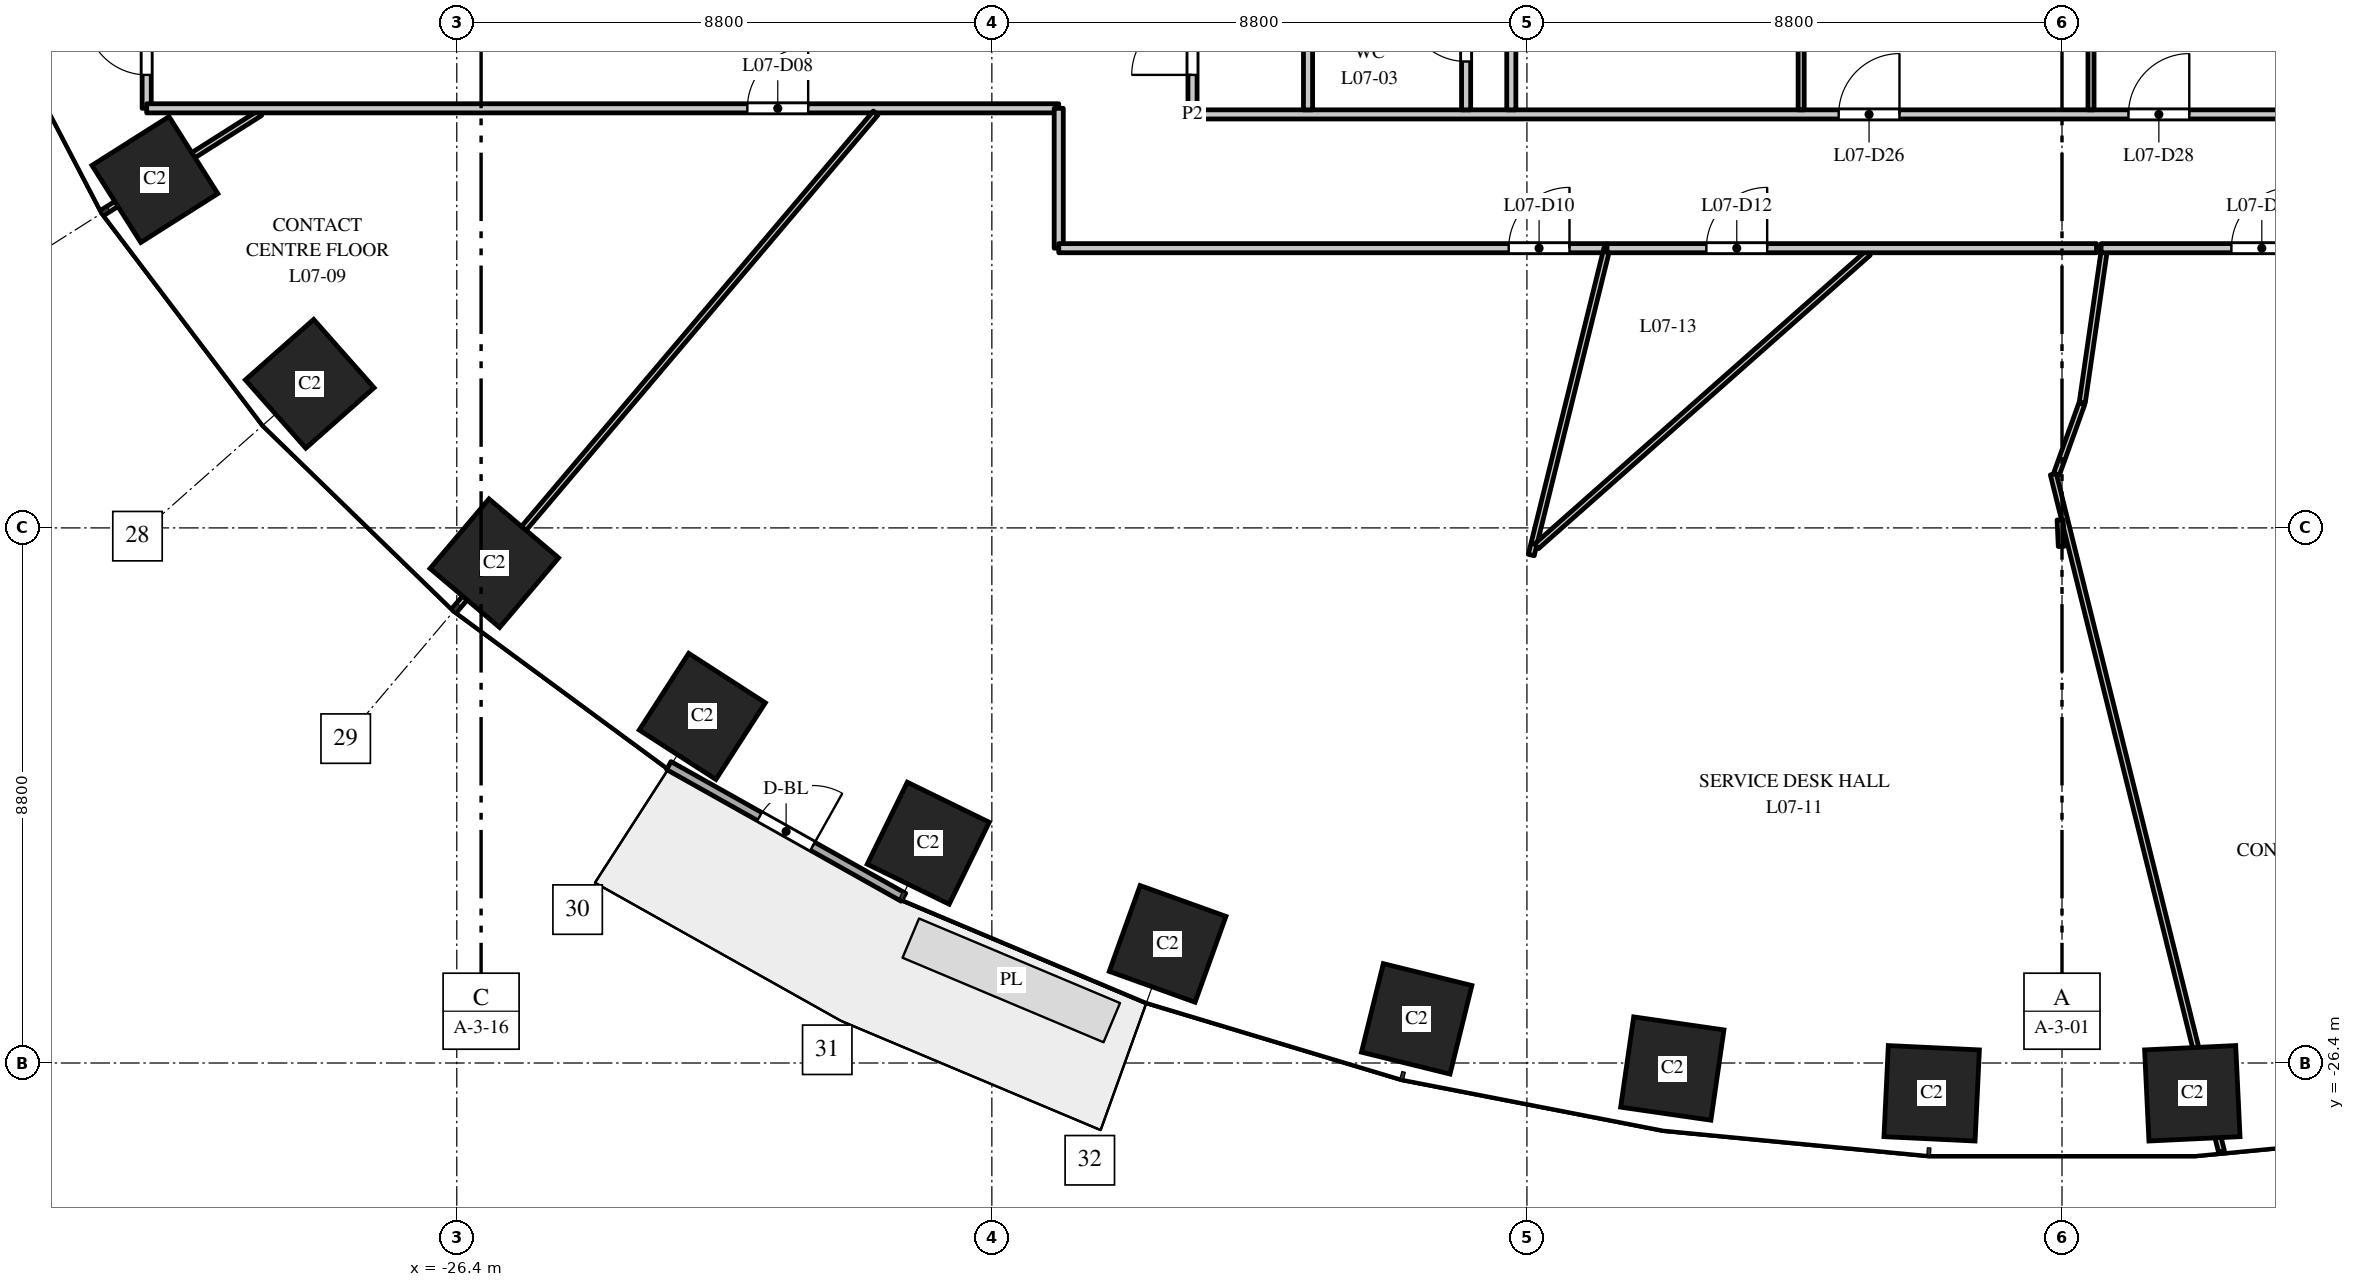
"""IFC4 building model, lengths in metres.
Left out: names, types, materials, properties, quantities, classifications, styles, units other than length and angle.
Written with IfcOpenShell. Run it as: python <this file> out.ifc"""

import sys

from ifc_helpers import new_model, si_unit, direction, frame, frame_2d, origin, origin_2d, place, context, subcontext, project, spatial, rectangle, extrude, element, fill, save


model = new_model("IFC4")
c1 = context("Model", 3, precision=1e-05, world=origin(), true_north=direction((0.0, 1.0)))
c2 = subcontext(c1, "Body", "Model", "MODEL_VIEW")
j1 = project(units=[si_unit("LENGTHUNIT", "METRE"), si_unit("PLANEANGLEUNIT", "RADIAN")], contexts=[c1])
p1 = place(None, origin())
s1 = spatial("IfcSite", under=j1, at=p1, CompositionType="ELEMENT")
p2 = place(p1, origin())
s2 = spatial("IfcBuilding", under=s1, at=p2, CompositionType="ELEMENT")
p3 = place(p2, frame((0.0, 0.0, 38.5)))
s3 = spatial("IfcBuildingStorey", under=s2, at=p3, CompositionType="ELEMENT", Elevation=38.5)
for number, where, z_axis, x_axis in (
    (1, (-31.365, -11.871, 0.0), (0.0, 0.0, 1.0), (0.535, -0.845, 0.0)),
    (2, (-28.819, -15.23, 0.0), (0.0, 0.0, 1.0), (0.663, -0.749, 0.0)),
    (3, (-25.783, -18.18, 0.0), (0.0, 0.0, 1.0), (0.763, -0.646, 0.0)),
    (4, (-22.362, -20.7, 0.0), (0.0, 0.0, 1.0), (0.84, -0.542, 0.0)),
    (5, (-18.646, -22.785, 0.0), (0.0, 0.0, 1.0), (0.898, -0.439, 0.0)),
    (6, (-14.709, -24.441, 0.0), (0.0, 0.0, 1.0), (0.941, -0.338, 0.0)),
    (7, (-10.613, -25.674, 0.0), (0.0, 0.0, 1.0), (0.971, -0.24, 0.0)),
    (8, (-6.409, -26.491, 0.0), (0.0, 0.0, 1.0), (0.99, -0.143, 0.0)),
    (9, (-2.143, -26.898, 0.0), (0.0, 0.0, 1.0), (0.999, -0.048, 0.0)),
    (10, (2.143, -26.898, 0.0), (0.0, 0.0, 1.0), (0.999, 0.048, 0.0)),
):
    element("IfcColumn", number, at=place(p3, frame(where, z_axis=z_axis, x_axis=x_axis)), inside=s3, PredefinedType="COLUMN", context=c2, shape_type="SweptSolid", body=[
        extrude(rectangle(XDim=1.5, YDim=1.5, at=origin_2d()), origin(), (0.0, 0.0, 1.0), 4.0),
    ])
p4 = place(p3, frame((-22.913, -21.509, 0.0), z_axis=(0.0, 0.0, 1.0), x_axis=(0.872046572975, -0.489422899509, 0.0)))
e11 = element("IfcWall", 11, at=p4, inside=s3, PredefinedType="STANDARD", context=c2, shape_type="SweptSolid", body=[
    extrude(rectangle(XDim=4.426, YDim=0.15, at=frame_2d((2.213, 0.0))), origin(), (0.0, 0.0, 1.0), 3.7),
])
p5 = place(p4, frame((1.713, 0.0, 0.0)))
e12 = element("IfcOpeningElement", 12, at=p5, cuts=e11, PredefinedType="OPENING", context=c2, shape_type="SweptSolid", body=[
    extrude(rectangle(XDim=1.0, YDim=2.4, at=frame_2d((0.5, 1.2))), frame((0.0, 0.085, 0.0), z_axis=(0.0, -1.0, 0.0), x_axis=(1.0, 0.0, 0.0)), (0.0, 0.0, 1.0), 0.17),
])
p6 = place(p3, frame((-32.212, -12.408, 0.0), z_axis=(0.0, 0.0, 1.0), x_axis=(0.844810627195, 0.535065420467, 0.0)))
e13 = element("IfcWall", 13, at=p6, inside=s3, PredefinedType="PARTITIONING", context=c2, shape_type="SweptSolid", body=[
    extrude(rectangle(XDim=3.048, YDim=0.1, at=frame_2d((1.524, 0.0))), origin(), (0.0, 0.0, 1.0), 3.7),
])
p7 = place(p3, frame((-31.5, -10.7, 0.0), z_axis=(0.0, 0.0, 1.0), x_axis=(0.0, 1.0, 0.0)))
e14 = element("IfcWall", 14, at=p7, inside=s3, PredefinedType="PARTITIONING", context=c2, shape_type="SweptSolid", body=[
    extrude(rectangle(XDim=2.2, YDim=0.15, at=frame_2d((1.1, 0.0))), origin(), (0.0, 0.0, 1.0), 3.7),
])
p8 = place(p7, frame((0.55, 0.0, 0.0)))
e15 = element("IfcOpeningElement", 15, at=p8, cuts=e14, PredefinedType="OPENING", context=c2, shape_type="SweptSolid", body=[
    extrude(rectangle(XDim=1.0, YDim=2.1, at=frame_2d((0.5, 1.05))), frame((0.0, 0.085, 0.0), z_axis=(0.0, -1.0, 0.0), x_axis=(1.0, 0.0, 0.0)), (0.0, 0.0, 1.0), 0.17),
])
p9 = place(p3, frame((-31.5, -10.7, 0.0), z_axis=(0.0, 0.0, 1.0), x_axis=(1.0, 0.0, 0.0)))
e16 = element("IfcWall", 16, at=p9, inside=s3, PredefinedType="PARTITIONING", context=c2, shape_type="SweptSolid", body=[
    extrude(rectangle(XDim=15.0, YDim=0.15, at=frame_2d((7.5, 0.0))), origin(), (0.0, 0.0, 1.0), 3.1),
])
p10 = place(p9, frame((9.879, 0.0, 0.0)))
e17 = element("IfcOpeningElement", 17, at=p10, cuts=e16, PredefinedType="OPENING", context=c2, shape_type="SweptSolid", body=[
    extrude(rectangle(XDim=1.0, YDim=2.1, at=frame_2d((0.5, 1.05))), frame((0.0, 0.085, 0.0), z_axis=(0.0, -1.0, 0.0), x_axis=(1.0, 0.0, 0.0)), (0.0, 0.0, 1.0), 0.17),
])
p11 = place(p3, frame((-26.43, -18.945, 0.0), z_axis=(0.0, 0.0, 1.0), x_axis=(0.646400187952, 0.762998556365, 0.0)))
e18 = element("IfcWall", 18, at=p11, inside=s3, PredefinedType="PARTITIONING", context=c2, shape_type="SweptSolid", body=[
    extrude(rectangle(XDim=10.704, YDim=0.1, at=frame_2d((5.352, 0.0))), origin(), (0.0, 0.0, 1.0), 3.7),
])
p12 = place(p3, frame((-16.5, -13.0, 0.0), z_axis=(0.0, 0.0, 1.0), x_axis=(0.0, 1.0, 0.0)))
e19 = element("IfcWall", 19, at=p12, inside=s3, PredefinedType="PARTITIONING", context=c2, shape_type="SweptSolid", body=[
    extrude(rectangle(XDim=2.3, YDim=0.15, at=frame_2d((1.15, 0.0))), origin(), (0.0, 0.0, 1.0), 2.75),
])
p13 = place(p3, frame((-16.5, -13.0, 0.0), z_axis=(0.0, 0.0, 1.0), x_axis=(1.0, 0.0, 0.0)))
e20 = element("IfcWall", 20, at=p13, inside=s3, PredefinedType="PARTITIONING", context=c2, shape_type="SweptSolid", body=[
    extrude(rectangle(XDim=9.001, YDim=0.15, at=frame_2d((4.5, 0.0))), origin(), (0.0, 0.0, 1.0), 2.85),
])
p14 = place(p13, frame((7.4, 0.0, 0.0)))
e21 = element("IfcOpeningElement", 21, at=p14, cuts=e20, PredefinedType="OPENING", context=c2, shape_type="SweptSolid", body=[
    extrude(rectangle(XDim=1.0, YDim=2.1, at=frame_2d((0.5, 1.05))), frame((0.0, 0.085, 0.0), z_axis=(0.0, -1.0, 0.0), x_axis=(1.0, 0.0, 0.0)), (0.0, 0.0, 1.0), 0.17),
])
p15 = place(p3, frame((-14.3, -10.8, 0.0), z_axis=(0.0, 0.0, 1.0), x_axis=(0.0, 1.0, 0.0)))
e22 = element("IfcWall", 22, at=p15, inside=s3, PredefinedType="PARTITIONING", context=c2, shape_type="SweptSolid", body=[
    extrude(rectangle(XDim=21.6, YDim=0.15, at=frame_2d((10.8, 0.0))), origin(), (0.0, 0.0, 1.0), 2.75),
])
p16 = place(p15, frame((0.65, 0.0, 0.0)))
e23 = element("IfcOpeningElement", 23, at=p16, cuts=e22, PredefinedType="OPENING", context=c2, shape_type="SweptSolid", body=[
    extrude(rectangle(XDim=1.0, YDim=2.1, at=frame_2d((0.5, 1.05))), frame((0.0, 0.085, 0.0), z_axis=(0.0, -1.0, 0.0), x_axis=(1.0, 0.0, 0.0)), (0.0, 0.0, 1.0), 0.17),
])
p17 = place(p3, frame((-14.3, -10.8, 0.0), z_axis=(0.0, 0.0, 1.0), x_axis=(1.0, 0.0, 0.0)))
e24 = element("IfcWall", 24, at=p17, inside=s3, PredefinedType="PARTITIONING", context=c2, shape_type="SweptSolid", body=[
    extrude(rectangle(XDim=28.6, YDim=0.15, at=frame_2d((14.3, 0.0))), origin(), (0.0, 0.0, 1.0), 2.85),
])
p18 = place(p17, frame((10.627, 0.0, 0.0)))
e25 = element("IfcOpeningElement", 25, at=p18, cuts=e24, PredefinedType="OPENING", context=c2, shape_type="SweptSolid", body=[
    extrude(rectangle(XDim=1.0, YDim=2.1, at=frame_2d((0.5, 1.05))), frame((0.0, 0.085, 0.0), z_axis=(0.0, -1.0, 0.0), x_axis=(1.0, 0.0, 0.0)), (0.0, 0.0, 1.0), 0.17),
])
p19 = place(p17, frame((15.393, 0.0, 0.0)))
e26 = element("IfcOpeningElement", 26, at=p19, cuts=e24, PredefinedType="OPENING", context=c2, shape_type="SweptSolid", body=[
    extrude(rectangle(XDim=1.0, YDim=2.1, at=frame_2d((0.5, 1.05))), frame((0.0, 0.085, 0.0), z_axis=(0.0, -1.0, 0.0), x_axis=(1.0, 0.0, 0.0)), (0.0, 0.0, 1.0), 0.17),
])
p20 = place(p3, frame((-12.4, -10.725, 0.0), z_axis=(0.0, 0.0, 1.0), x_axis=(0.0, 1.0, 0.0)))
e27 = element("IfcWall", 27, at=p20, inside=s3, PredefinedType="PARTITIONING", context=c2, shape_type="SweptSolid", body=[
    extrude(rectangle(XDim=7.065, YDim=0.15, at=frame_2d((3.533, 0.0))), origin(), (0.0, 0.0, 1.0), 2.75),
])
p21 = place(p20, frame((3.095, 0.0, 0.0)))
e28 = element("IfcOpeningElement", 28, at=p21, cuts=e27, PredefinedType="OPENING", context=c2, shape_type="SweptSolid", body=[
    extrude(rectangle(XDim=1.0, YDim=2.1, at=frame_2d((0.5, 1.05))), frame((0.0, 0.085, 0.0), z_axis=(0.0, -1.0, 0.0), x_axis=(1.0, 0.0, 0.0)), (0.0, 0.0, 1.0), 0.17),
])
p22 = place(p20, frame((5.447, 0.0, 0.0)))
e29 = element("IfcOpeningElement", 29, at=p22, cuts=e27, PredefinedType="OPENING", context=c2, shape_type="SweptSolid", body=[
    extrude(rectangle(XDim=1.0, YDim=2.1, at=frame_2d((0.5, 1.05))), frame((0.0, 0.085, 0.0), z_axis=(0.0, -1.0, 0.0), x_axis=(1.0, 0.0, 0.0)), (0.0, 0.0, 1.0), 0.17),
])
p23 = place(p3, frame((-9.8, -10.725, 0.0), z_axis=(0.0, 0.0, 1.0), x_axis=(0.0, 1.0, 0.0)))
e30 = element("IfcWall", 30, at=p23, inside=s3, PredefinedType="PARTITIONING", context=c2, shape_type="SweptSolid", body=[
    extrude(rectangle(XDim=7.065, YDim=0.15, at=frame_2d((3.533, 0.0))), origin(), (0.0, 0.0, 1.0), 2.75),
])
p24 = place(p23, frame((0.795, 0.0, 0.0)))
e31 = element("IfcOpeningElement", 31, at=p24, cuts=e30, PredefinedType="OPENING", context=c2, shape_type="SweptSolid", body=[
    extrude(rectangle(XDim=1.0, YDim=2.1, at=frame_2d((0.5, 1.05))), frame((0.0, 0.085, 0.0), z_axis=(0.0, -1.0, 0.0), x_axis=(1.0, 0.0, 0.0)), (0.0, 0.0, 1.0), 0.17),
])
p25 = place(p3, frame((-9.057, -10.725, 0.0), z_axis=(0.0, 0.0, 1.0), x_axis=(0.0, 1.0, 0.0)))
e32 = element("IfcWall", 32, at=p25, inside=s3, PredefinedType="PARTITIONING", context=c2, shape_type="SweptSolid", body=[
    extrude(rectangle(XDim=10.68, YDim=0.15, at=frame_2d((5.34, 0.0))), origin(), (0.0, 0.0, 1.0), 2.75),
])
p26 = place(p25, frame((5.075, 0.0, 0.0)))
e33 = element("IfcOpeningElement", 33, at=p26, cuts=e32, PredefinedType="OPENING", context=c2, shape_type="SweptSolid", body=[
    extrude(rectangle(XDim=1.0, YDim=2.1, at=frame_2d((0.5, 1.05))), frame((0.0, 0.085, 0.0), z_axis=(0.0, -1.0, 0.0), x_axis=(1.0, 0.0, 0.0)), (0.0, 0.0, 1.0), 0.17),
])
p27 = place(p3, frame((-8.729, -18.046, 0.0), z_axis=(0.0, 0.0, 1.0), x_axis=(0.239749411988, 0.970834805439, 0.0)))
e34 = element("IfcWall", 34, at=p27, inside=s3, PredefinedType="PARTITIONING", context=c2, shape_type="SweptSolid", body=[
    extrude(rectangle(XDim=5.198, YDim=0.1, at=frame_2d((2.599, 0.0))), origin(), (0.0, 0.0, 1.0), 3.7),
])
p28 = place(p3, frame((-8.642, -17.903, 0.0), z_axis=(0.0, 0.0, 1.0), x_axis=(0.749027274438, 0.662539162728, 0.0)))
e35 = element("IfcWall", 35, at=p28, inside=s3, PredefinedType="PARTITIONING", context=c2, shape_type="SweptSolid", body=[
    extrude(rectangle(XDim=7.283, YDim=0.1, at=frame_2d((3.642, 0.0))), origin(), (0.0, 0.0, 1.0), 2.85),
])
p29 = place(p3, frame((-7.483, -13.0, 0.0), z_axis=(0.0, 0.0, 1.0), x_axis=(1.0, 0.0, 0.0)))
e36 = element("IfcWall", 36, at=p29, inside=s3, PredefinedType="PARTITIONING", context=c2, shape_type="SweptSolid", body=[
    extrude(rectangle(XDim=8.051, YDim=0.15, at=frame_2d((4.025, 0.0))), origin(), (0.0, 0.0, 1.0), 2.85),
])
p30 = place(p29, frame((1.634, 0.0, 0.0)))
e37 = element("IfcOpeningElement", 37, at=p30, cuts=e36, PredefinedType="OPENING", context=c2, shape_type="SweptSolid", body=[
    extrude(rectangle(XDim=1.0, YDim=2.1, at=frame_2d((0.5, 1.05))), frame((0.0, 0.085, 0.0), z_axis=(0.0, -1.0, 0.0), x_axis=(1.0, 0.0, 0.0)), (0.0, 0.0, 1.0), 0.17),
])
p31 = place(p3, frame((-4.29, -10.725, 0.0), z_axis=(0.0, 0.0, 1.0), x_axis=(0.0, 1.0, 0.0)))
e38 = element("IfcWall", 38, at=p31, inside=s3, PredefinedType="PARTITIONING", context=c2, shape_type="SweptSolid", body=[
    extrude(rectangle(XDim=4.157, YDim=0.1, at=frame_2d((2.079, 0.0))), origin(), (0.0, 0.0, 1.0), 2.85),
])
p32 = place(p3, frame((-0.143, -16.716, 0.0), z_axis=(0.0, 0.0, 1.0), x_axis=(0.24100876492, -0.970522939055, 0.0)))
e39 = element("IfcWall", 39, at=p32, inside=s3, PredefinedType="PARTITIONING", context=c2, shape_type="SweptSolid", body=[
    extrude(rectangle(XDim=11.477, YDim=0.1, at=frame_2d((5.739, 0.0))), origin(), (0.0, 0.0, 1.0), 2.85),
])
p33 = place(p3, frame((-0.091, -16.717, 0.0), z_axis=(0.0, 0.0, 1.0), x_axis=(0.338558024313, 0.940945516049, 0.0)))
e40 = element("IfcWall", 40, at=p33, inside=s3, PredefinedType="PARTITIONING", context=c2, shape_type="SweptSolid", body=[
    extrude(rectangle(XDim=1.232, YDim=0.1, at=frame_2d((0.616, 0.0))), origin(), (0.0, 0.0, 1.0), 3.7),
])
p34 = place(p3, frame((-0.031, -17.468, 0.0), z_axis=(0.0, 0.0, 1.0), x_axis=(0.045864339057, -0.99894767751, 0.0)))
e41 = element("IfcWall", 41, at=p34, inside=s3, PredefinedType="PARTITIONING", context=c2, shape_type="SweptSolid", body=[
    extrude(rectangle(XDim=0.437, YDim=0.1, at=frame_2d((0.218, 0.0))), origin(), (0.0, 0.0, 1.0), 3.7),
])
p35 = place(p3, frame((0.333, -15.539, 0.0), z_axis=(0.0, 0.0, 1.0), x_axis=(0.143115891067, 0.989705936996, 0.0)))
e42 = element("IfcWall", 42, at=p35, inside=s3, PredefinedType="PARTITIONING", context=c2, shape_type="SweptSolid", body=[
    extrude(rectangle(XDim=2.501, YDim=0.1, at=frame_2d((1.25, 0.0))), origin(), (0.0, 0.0, 1.0), 3.7),
])
p36 = place(p3, frame((0.477, -10.725, 0.0), z_axis=(0.0, 0.0, 1.0), x_axis=(0.0, 1.0, 0.0)))
e43 = element("IfcWall", 43, at=p36, inside=s3, PredefinedType="PARTITIONING", context=c2, shape_type="SweptSolid", body=[
    extrude(rectangle(XDim=3.257, YDim=0.1, at=frame_2d((1.628, 0.0))), origin(), (0.0, 0.0, 1.0), 2.85),
])
p37 = place(p3, frame((0.643, -13.0, 0.0), z_axis=(0.0, 0.0, 1.0), x_axis=(1.0, 0.0, 0.0)))
e44 = element("IfcWall", 44, at=p37, inside=s3, PredefinedType="PARTITIONING", context=c2, shape_type="SweptSolid", body=[
    extrude(rectangle(XDim=3.816, YDim=0.15, at=frame_2d((1.908, 0.0))), origin(), (0.0, 0.0, 1.0), 2.85),
])
p38 = place(p37, frame((2.143, 0.0, 0.0)))
e45 = element("IfcOpeningElement", 45, at=p38, cuts=e44, PredefinedType="OPENING", context=c2, shape_type="SweptSolid", body=[
    extrude(rectangle(XDim=1.0, YDim=2.1, at=frame_2d((0.5, 1.05))), frame((0.0, 0.085, 0.0), z_axis=(0.0, -1.0, 0.0), x_axis=(1.0, 0.0, 0.0)), (0.0, 0.0, 1.0), 0.17),
])
p39 = place(p5, origin())
e46 = element("IfcDoor", 46, at=p39, inside=s3, OperationType="SINGLE_SWING_RIGHT", PredefinedType="DOOR", context=c2, shape_type="SweptSolid", body=[
    extrude(rectangle(XDim=1.0, YDim=2.4, at=frame_2d((0.5, 1.2))), frame((0.0, 0.025, 0.0), z_axis=(0.0, -1.0, 0.0), x_axis=(1.0, 0.0, 0.0)), (0.0, 0.0, 1.0), 0.05),
])
fill(e12, e46)
p40 = place(p16, origin())
e47 = element("IfcDoor", 47, at=p40, inside=s3, OperationType="SINGLE_SWING_LEFT", PredefinedType="DOOR", context=c2, shape_type="SweptSolid", body=[
    extrude(rectangle(XDim=1.0, YDim=2.1, at=frame_2d((0.5, 1.05))), frame((0.0, 0.025, 0.0), z_axis=(0.0, -1.0, 0.0), x_axis=(1.0, 0.0, 0.0)), (0.0, 0.0, 1.0), 0.05),
])
fill(e23, e47)
p41 = place(p24, origin())
e48 = element("IfcDoor", 48, at=p41, inside=s3, OperationType="SINGLE_SWING_RIGHT", PredefinedType="DOOR", context=c2, shape_type="SweptSolid", body=[
    extrude(rectangle(XDim=1.0, YDim=2.1, at=frame_2d((0.5, 1.05))), frame((0.0, 0.025, 0.0), z_axis=(0.0, -1.0, 0.0), x_axis=(1.0, 0.0, 0.0)), (0.0, 0.0, 1.0), 0.05),
])
fill(e31, e48)
p42 = place(p8, origin())
e49 = element("IfcDoor", 49, at=p42, inside=s3, OperationType="SINGLE_SWING_RIGHT", PredefinedType="DOOR", context=c2, shape_type="SweptSolid", body=[
    extrude(rectangle(XDim=1.0, YDim=2.1, at=frame_2d((0.5, 1.05))), frame((0.0, 0.025, 0.0), z_axis=(0.0, -1.0, 0.0), x_axis=(1.0, 0.0, 0.0)), (0.0, 0.0, 1.0), 0.05),
])
fill(e15, e49)
p43 = place(p10, origin())
e50 = element("IfcDoor", 50, at=p43, inside=s3, OperationType="SINGLE_SWING_RIGHT", PredefinedType="DOOR", context=c2, shape_type="SweptSolid", body=[
    extrude(rectangle(XDim=1.0, YDim=2.1, at=frame_2d((0.5, 1.05))), frame((0.0, 0.025, 0.0), z_axis=(0.0, -1.0, 0.0), x_axis=(1.0, 0.0, 0.0)), (0.0, 0.0, 1.0), 0.05),
])
fill(e17, e50)
p44 = place(p14, origin())
e51 = element("IfcDoor", 51, at=p44, inside=s3, OperationType="SINGLE_SWING_RIGHT", PredefinedType="DOOR", context=c2, shape_type="SweptSolid", body=[
    extrude(rectangle(XDim=1.0, YDim=2.1, at=frame_2d((0.5, 1.05))), frame((0.0, 0.025, 0.0), z_axis=(0.0, -1.0, 0.0), x_axis=(1.0, 0.0, 0.0)), (0.0, 0.0, 1.0), 0.05),
])
fill(e21, e51)
p45 = place(p30, origin())
e52 = element("IfcDoor", 52, at=p45, inside=s3, OperationType="SINGLE_SWING_RIGHT", PredefinedType="DOOR", context=c2, shape_type="SweptSolid", body=[
    extrude(rectangle(XDim=1.0, YDim=2.1, at=frame_2d((0.5, 1.05))), frame((0.0, 0.025, 0.0), z_axis=(0.0, -1.0, 0.0), x_axis=(1.0, 0.0, 0.0)), (0.0, 0.0, 1.0), 0.05),
])
fill(e37, e52)
p46 = place(p38, origin())
e53 = element("IfcDoor", 53, at=p46, inside=s3, OperationType="SINGLE_SWING_RIGHT", PredefinedType="DOOR", context=c2, shape_type="SweptSolid", body=[
    extrude(rectangle(XDim=1.0, YDim=2.1, at=frame_2d((0.5, 1.05))), frame((0.0, 0.025, 0.0), z_axis=(0.0, -1.0, 0.0), x_axis=(1.0, 0.0, 0.0)), (0.0, 0.0, 1.0), 0.05),
])
fill(e45, e53)
p47 = place(p18, origin())
e54 = element("IfcDoor", 54, at=p47, inside=s3, OperationType="SINGLE_SWING_RIGHT", PredefinedType="DOOR", context=c2, shape_type="SweptSolid", body=[
    extrude(rectangle(XDim=1.0, YDim=2.1, at=frame_2d((0.5, 1.05))), frame((0.0, 0.025, 0.0), z_axis=(0.0, -1.0, 0.0), x_axis=(1.0, 0.0, 0.0)), (0.0, 0.0, 1.0), 0.05),
])
fill(e25, e54)
p48 = place(p19, origin())
e55 = element("IfcDoor", 55, at=p48, inside=s3, OperationType="SINGLE_SWING_RIGHT", PredefinedType="DOOR", context=c2, shape_type="SweptSolid", body=[
    extrude(rectangle(XDim=1.0, YDim=2.1, at=frame_2d((0.5, 1.05))), frame((0.0, 0.025, 0.0), z_axis=(0.0, -1.0, 0.0), x_axis=(1.0, 0.0, 0.0)), (0.0, 0.0, 1.0), 0.05),
])
fill(e26, e55)
save(model, sys.argv[1])
